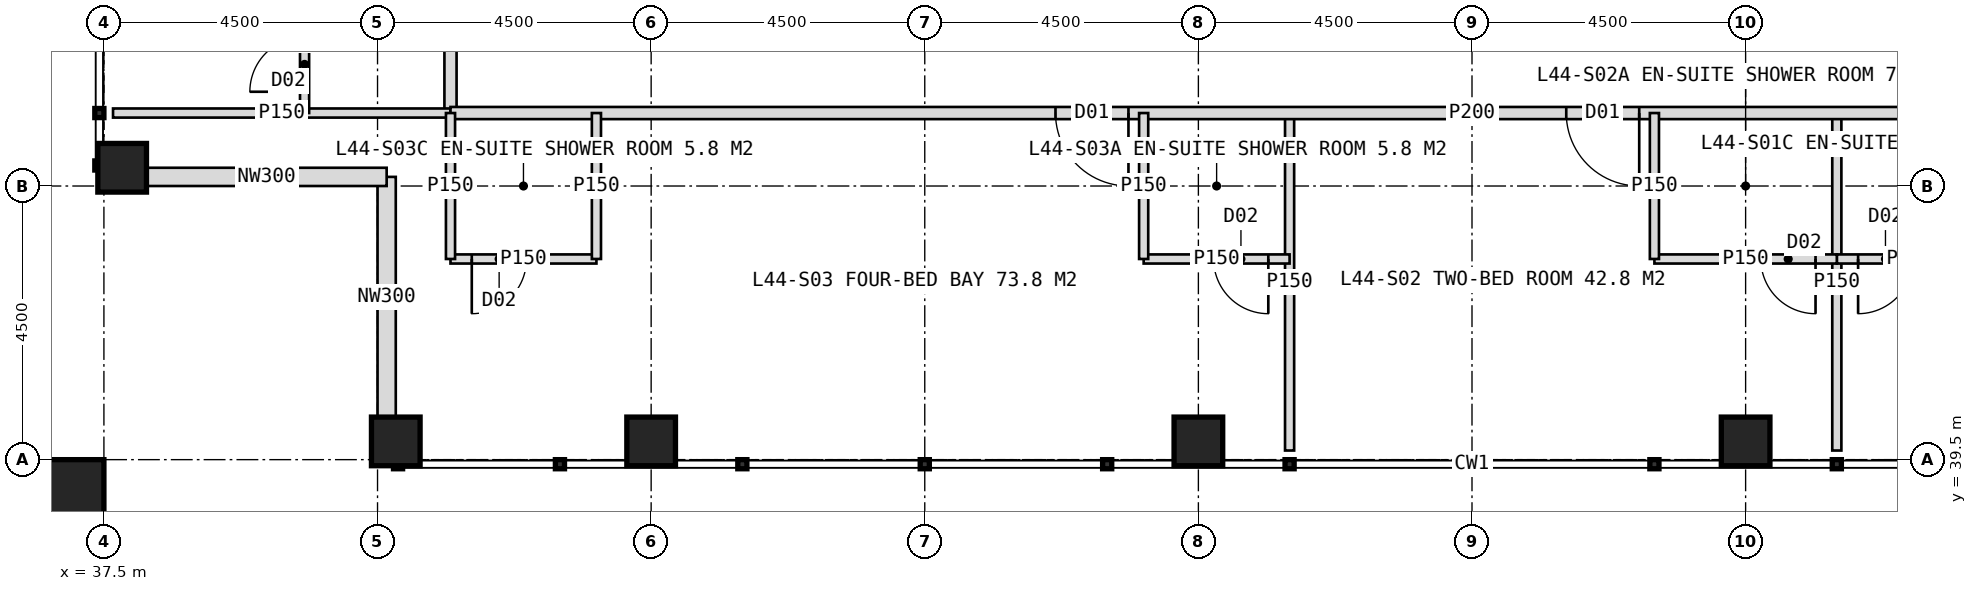
"""IFC4 building model, lengths in metres.
Left out: names, types, materials, properties, quantities, classifications, styles, units other than length and angle.
Written with IfcOpenShell. Run it as: python <this file> out.ifc"""

import sys

from ifc_helpers import new_model, si_unit, direction, frame, frame_2d, origin, origin_2d, place, context, subcontext, project, spatial, rectangle, hollow_rectangle, extrude, element, fill, save


model = new_model("IFC4")
c1 = context("Model", 3, precision=1e-05, world=origin(), true_north=direction((0.0, 1.0)))
c2 = subcontext(c1, "Body", "Model", "MODEL_VIEW")
j1 = project(units=[si_unit("LENGTHUNIT", "METRE"), si_unit("PLANEANGLEUNIT", "RADIAN")], contexts=[c1])
p1 = place(None, origin())
s1 = spatial("IfcSite", under=j1, at=p1, CompositionType="ELEMENT")
p2 = place(p1, origin())
s2 = spatial("IfcBuilding", under=s1, at=p2, CompositionType="ELEMENT")
p3 = place(p2, frame((0.0, 0.0, 185.0)))
s3 = spatial("IfcBuildingStorey", under=s2, at=p3, CompositionType="ELEMENT", Elevation=185.0)
for number, where, z_axis, x_axis in (
    (1, (42.3, 39.8, 0.0), (0.0, 0.0, 1.0), (1.0, 0.0, 0.0)),
    (2, (37.8, 44.3, 0.0), (0.0, 0.0, 1.0), (1.0, 0.0, 0.0)),
    (3, (46.5, 39.8, 0.0), (0.0, 0.0, 1.0), (1.0, 0.0, 0.0)),
    (4, (55.5, 39.8, 0.0), (0.0, 0.0, 1.0), (1.0, 0.0, 0.0)),
    (5, (64.5, 39.8, 0.0), (0.0, 0.0, 1.0), (1.0, 0.0, 0.0)),
):
    element("IfcColumn", number, at=place(p3, frame(where, z_axis=z_axis, x_axis=x_axis)), inside=s3, PredefinedType="COLUMN", context=c2, shape_type="SweptSolid", body=[
        extrude(hollow_rectangle(XDim=0.8, YDim=0.8, WallThickness=0.08, at=origin_2d()), origin(), (0.0, 0.0, 1.0), 4.0),
    ])
p4 = place(p3, frame((36.9, 38.9, 0.0), z_axis=(0.0, 0.0, 1.0), x_axis=(1.0, 0.0, 0.0)))
e6 = element("IfcColumn", 6, at=p4, inside=s3, PredefinedType="COLUMN", context=c2, shape_type="SweptSolid", body=[
    extrude(hollow_rectangle(XDim=1.2, YDim=1.2, WallThickness=0.07, at=origin_2d()), origin(), (0.0, 0.0, 1.0), 4.0),
])
for number, where, z_axis, x_axis in (
    (7, (42.15, 40.2, 0.0), (0.0, 0.0, 1.0), (0.0, 1.0, 0.0)),
    (8, (42.15, 44.15, 0.0), (0.0, 0.0, 1.0), (-1.0, 0.0, 0.0)),
):
    element("IfcWall", number, at=place(p3, frame(where, z_axis=z_axis, x_axis=x_axis)), inside=s3, PredefinedType="ELEMENTEDWALL", context=c2, shape_type="SweptSolid", body=[
        extrude(rectangle(XDim=3.95, YDim=0.3, at=frame_2d((1.975, 0.0))), origin(), (0.0, 0.0, 1.0), 2.85),
    ])
p5 = place(p3, frame((43.2, 45.2, 0.0), z_axis=(0.0, 0.0, 1.0), x_axis=(0.0, 1.0, 0.0)))
e9 = element("IfcWall", 9, at=p5, inside=s3, PredefinedType="PARTITIONING", context=c2, shape_type="SweptSolid", body=[
    extrude(rectangle(XDim=33.6, YDim=0.2, at=frame_2d((16.8, 0.0))), origin(), (0.0, 0.0, 1.0), 3.75),
])
p6 = place(p5, frame((2.65, 0.0, 0.0)))
e10 = element("IfcOpeningElement", 10, at=p6, cuts=e9, PredefinedType="OPENING", context=c2, shape_type="SweptSolid", body=[
    extrude(rectangle(XDim=1.2, YDim=2.2, at=frame_2d((0.6, 1.1))), frame((0.0, 0.11, 0.0), z_axis=(0.0, -1.0, 0.0), x_axis=(1.0, 0.0, 0.0)), (0.0, 0.0, 1.0), 0.22),
])
p7 = place(p5, frame((13.45, 0.0, 0.0)))
e11 = element("IfcOpeningElement", 11, at=p7, cuts=e9, PredefinedType="OPENING", context=c2, shape_type="SweptSolid", body=[
    extrude(rectangle(XDim=1.2, YDim=2.2, at=frame_2d((0.6, 1.1))), frame((0.0, 0.11, 0.0), z_axis=(0.0, -1.0, 0.0), x_axis=(1.0, 0.0, 0.0)), (0.0, 0.0, 1.0), 0.22),
])
p8 = place(p5, frame((20.05, 0.0, 0.0)))
e12 = element("IfcOpeningElement", 12, at=p8, cuts=e9, PredefinedType="OPENING", context=c2, shape_type="SweptSolid", body=[
    extrude(rectangle(XDim=1.2, YDim=2.2, at=frame_2d((0.6, 1.1))), frame((0.0, 0.11, 0.0), z_axis=(0.0, -1.0, 0.0), x_axis=(1.0, 0.0, 0.0)), (0.0, 0.0, 1.0), 0.22),
])
p9 = place(p5, frame((29.05, 0.0, 0.0)))
e13 = element("IfcOpeningElement", 13, at=p9, cuts=e9, PredefinedType="OPENING", context=c2, shape_type="SweptSolid", body=[
    extrude(rectangle(XDim=1.2, YDim=2.2, at=frame_2d((0.6, 1.1))), frame((0.0, 0.11, 0.0), z_axis=(0.0, -1.0, 0.0), x_axis=(1.0, 0.0, 0.0)), (0.0, 0.0, 1.0), 0.22),
])
p10 = place(p3, frame((43.2, 45.2, 0.0), z_axis=(0.0, 0.0, 1.0), x_axis=(-1.0, 0.0, 0.0)))
e14 = element("IfcWall", 14, at=p10, inside=s3, PredefinedType="PARTITIONING", context=c2, shape_type="SweptSolid", body=[
    extrude(rectangle(XDim=5.55, YDim=0.15, at=frame_2d((2.775, 0.0))), origin(), (0.0, 0.0, 1.0), 3.75),
])
p11 = place(p3, frame((40.8, 45.2, 0.0), z_axis=(0.0, 0.0, 1.0), x_axis=(0.0, 1.0, 0.0)))
e15 = element("IfcWall", 15, at=p11, inside=s3, PredefinedType="PARTITIONING", context=c2, shape_type="SweptSolid", body=[
    extrude(rectangle(XDim=2.4, YDim=0.15, at=frame_2d((1.2, 0.0))), origin(), (0.0, 0.0, 1.0), 3.75),
])
p12 = place(p11, frame((0.35, 0.0, 0.0)))
e16 = element("IfcOpeningElement", 16, at=p12, cuts=e15, PredefinedType="OPENING", context=c2, shape_type="SweptSolid", body=[
    extrude(rectangle(XDim=0.9, YDim=2.1, at=frame_2d((0.45, 1.05))), frame((0.0, 0.085, 0.0), z_axis=(0.0, -1.0, 0.0), x_axis=(1.0, 0.0, 0.0)), (0.0, 0.0, 1.0), 0.17),
])
for number, where, z_axis, x_axis in (
    (17, (66.0, 45.2, 0.0), (0.0, 0.0, 1.0), (0.0, -1.0, 0.0)),
    (18, (57.0, 45.2, 0.0), (0.0, 0.0, 1.0), (0.0, -1.0, 0.0)),
):
    element("IfcWall", number, at=place(p3, frame(where, z_axis=z_axis, x_axis=x_axis)), inside=s3, PredefinedType="PARTITIONING", context=c2, shape_type="SweptSolid", body=[
        extrude(rectangle(XDim=5.55, YDim=0.15, at=frame_2d((2.775, 0.0))), origin(), (0.0, 0.0, 1.0), 3.75),
    ])
p13 = place(p3, frame((76.8, 45.2, 0.0), z_axis=(0.0, 0.0, 1.0), x_axis=(-1.0, 0.0, 0.0)))
e19 = element("IfcWall", 19, at=p13, inside=s3, PredefinedType="PARTITIONING", context=c2, shape_type="SweptSolid", body=[
    extrude(rectangle(XDim=33.6, YDim=0.2, at=frame_2d((16.8, 0.0))), origin(), (0.0, 0.0, 1.0), 3.75),
])
p14 = place(p13, frame((2.65, 0.0, 0.0)))
e20 = element("IfcOpeningElement", 20, at=p14, cuts=e19, PredefinedType="OPENING", context=c2, shape_type="SweptSolid", body=[
    extrude(rectangle(XDim=1.2, YDim=2.2, at=frame_2d((0.6, 1.1))), frame((0.0, 0.11, 0.0), z_axis=(0.0, -1.0, 0.0), x_axis=(1.0, 0.0, 0.0)), (0.0, 0.0, 1.0), 0.22),
])
p15 = place(p13, frame((14.05, 0.0, 0.0)))
e21 = element("IfcOpeningElement", 21, at=p15, cuts=e19, PredefinedType="OPENING", context=c2, shape_type="SweptSolid", body=[
    extrude(rectangle(XDim=1.2, YDim=2.2, at=frame_2d((0.6, 1.1))), frame((0.0, 0.11, 0.0), z_axis=(0.0, -1.0, 0.0), x_axis=(1.0, 0.0, 0.0)), (0.0, 0.0, 1.0), 0.22),
])
p16 = place(p13, frame((22.45, 0.0, 0.0)))
e22 = element("IfcOpeningElement", 22, at=p16, cuts=e19, PredefinedType="OPENING", context=c2, shape_type="SweptSolid", body=[
    extrude(rectangle(XDim=1.2, YDim=2.2, at=frame_2d((0.6, 1.1))), frame((0.0, 0.11, 0.0), z_axis=(0.0, -1.0, 0.0), x_axis=(1.0, 0.0, 0.0)), (0.0, 0.0, 1.0), 0.22),
])
p17 = place(p3, frame((68.4, 42.8, 0.0), z_axis=(0.0, 0.0, 1.0), x_axis=(-1.0, 0.0, 0.0)))
e23 = element("IfcWall", 23, at=p17, inside=s3, PredefinedType="PARTITIONING", context=c2, shape_type="SweptSolid", body=[
    extrude(rectangle(XDim=2.4, YDim=0.15, at=frame_2d((1.2, 0.0))), origin(), (0.0, 0.0, 1.0), 3.75),
])
p18 = place(p17, frame((1.15, 0.0, 0.0)))
e24 = element("IfcOpeningElement", 24, at=p18, cuts=e23, PredefinedType="OPENING", context=c2, shape_type="SweptSolid", body=[
    extrude(rectangle(XDim=0.9, YDim=2.1, at=frame_2d((0.45, 1.05))), frame((0.0, 0.085, 0.0), z_axis=(0.0, -1.0, 0.0), x_axis=(1.0, 0.0, 0.0)), (0.0, 0.0, 1.0), 0.17),
])
p19 = place(p3, frame((66.0, 42.8, 0.0), z_axis=(0.0, 0.0, 1.0), x_axis=(-1.0, 0.0, 0.0)))
e25 = element("IfcWall", 25, at=p19, inside=s3, PredefinedType="PARTITIONING", context=c2, shape_type="SweptSolid", body=[
    extrude(rectangle(XDim=3.0, YDim=0.15, at=frame_2d((1.5, 0.0))), origin(), (0.0, 0.0, 1.0), 3.75),
])
p20 = place(p19, frame((0.35, 0.0, 0.0)))
e26 = element("IfcOpeningElement", 26, at=p20, cuts=e25, PredefinedType="OPENING", context=c2, shape_type="SweptSolid", body=[
    extrude(rectangle(XDim=0.9, YDim=2.1, at=frame_2d((0.45, 1.05))), frame((0.0, 0.085, 0.0), z_axis=(0.0, -1.0, 0.0), x_axis=(1.0, 0.0, 0.0)), (0.0, 0.0, 1.0), 0.17),
])
p21 = place(p3, frame((63.0, 45.2, 0.0), z_axis=(0.0, 0.0, 1.0), x_axis=(0.0, -1.0, 0.0)))
e27 = element("IfcWall", 27, at=p21, inside=s3, PredefinedType="PARTITIONING", context=c2, shape_type="SweptSolid", body=[
    extrude(rectangle(XDim=2.4, YDim=0.15, at=frame_2d((1.2, 0.0))), origin(), (0.0, 0.0, 1.0), 3.75),
])
p22 = place(p3, frame((57.0, 42.8, 0.0), z_axis=(0.0, 0.0, 1.0), x_axis=(-1.0, 0.0, 0.0)))
e28 = element("IfcWall", 28, at=p22, inside=s3, PredefinedType="PARTITIONING", context=c2, shape_type="SweptSolid", body=[
    extrude(rectangle(XDim=2.4, YDim=0.15, at=frame_2d((1.2, 0.0))), origin(), (0.0, 0.0, 1.0), 3.75),
])
p23 = place(p22, frame((0.35, 0.0, 0.0)))
e29 = element("IfcOpeningElement", 29, at=p23, cuts=e28, PredefinedType="OPENING", context=c2, shape_type="SweptSolid", body=[
    extrude(rectangle(XDim=0.9, YDim=2.1, at=frame_2d((0.45, 1.05))), frame((0.0, 0.085, 0.0), z_axis=(0.0, -1.0, 0.0), x_axis=(1.0, 0.0, 0.0)), (0.0, 0.0, 1.0), 0.17),
])
p24 = place(p3, frame((54.6, 45.2, 0.0), z_axis=(0.0, 0.0, 1.0), x_axis=(0.0, -1.0, 0.0)))
e30 = element("IfcWall", 30, at=p24, inside=s3, PredefinedType="PARTITIONING", context=c2, shape_type="SweptSolid", body=[
    extrude(rectangle(XDim=2.4, YDim=0.15, at=frame_2d((1.2, 0.0))), origin(), (0.0, 0.0, 1.0), 3.75),
])
p25 = place(p3, frame((45.6, 42.8, 0.0), z_axis=(0.0, 0.0, 1.0), x_axis=(-1.0, 0.0, 0.0)))
e31 = element("IfcWall", 31, at=p25, inside=s3, PredefinedType="PARTITIONING", context=c2, shape_type="SweptSolid", body=[
    extrude(rectangle(XDim=2.4, YDim=0.15, at=frame_2d((1.2, 0.0))), origin(), (0.0, 0.0, 1.0), 3.75),
])
p26 = place(p25, frame((1.15, 0.0, 0.0)))
e32 = element("IfcOpeningElement", 32, at=p26, cuts=e31, PredefinedType="OPENING", context=c2, shape_type="SweptSolid", body=[
    extrude(rectangle(XDim=0.9, YDim=2.1, at=frame_2d((0.45, 1.05))), frame((0.0, 0.085, 0.0), z_axis=(0.0, -1.0, 0.0), x_axis=(1.0, 0.0, 0.0)), (0.0, 0.0, 1.0), 0.17),
])
for number, where, z_axis, x_axis in (
    (33, (45.6, 45.2, 0.0), (0.0, 0.0, 1.0), (0.0, -1.0, 0.0)),
    (34, (43.2, 45.2, 0.0), (0.0, 0.0, 1.0), (0.0, -1.0, 0.0)),
):
    element("IfcWall", number, at=place(p3, frame(where, z_axis=z_axis, x_axis=x_axis)), inside=s3, PredefinedType="PARTITIONING", context=c2, shape_type="SweptSolid", body=[
        extrude(rectangle(XDim=2.4, YDim=0.15, at=frame_2d((1.2, 0.0))), origin(), (0.0, 0.0, 1.0), 3.75),
    ])
p27 = place(p12, origin())
e35 = element("IfcDoor", 35, at=p27, inside=s3, OperationType="SINGLE_SWING_LEFT", PredefinedType="DOOR", context=c2, shape_type="SweptSolid", body=[
    extrude(rectangle(XDim=0.9, YDim=2.1, at=frame_2d((0.45, 1.05))), frame((0.0, 0.025, 0.0), z_axis=(0.0, -1.0, 0.0), x_axis=(1.0, 0.0, 0.0)), (0.0, 0.0, 1.0), 0.05),
])
fill(e16, e35)
p28 = place(p18, origin())
e36 = element("IfcDoor", 36, at=p28, inside=s3, OperationType="SINGLE_SWING_RIGHT", PredefinedType="DOOR", context=c2, shape_type="SweptSolid", body=[
    extrude(rectangle(XDim=0.9, YDim=2.1, at=frame_2d((0.45, 1.05))), frame((0.0, 0.025, 0.0), z_axis=(0.0, -1.0, 0.0), x_axis=(1.0, 0.0, 0.0)), (0.0, 0.0, 1.0), 0.05),
])
fill(e24, e36)
p29 = place(p15, origin())
e37 = element("IfcDoor", 37, at=p29, inside=s3, OperationType="SINGLE_SWING_LEFT", PredefinedType="DOOR", context=c2, shape_type="SweptSolid", body=[
    extrude(rectangle(XDim=1.2, YDim=2.2, at=frame_2d((0.6, 1.1))), frame((0.0, 0.025, 0.0), z_axis=(0.0, -1.0, 0.0), x_axis=(1.0, 0.0, 0.0)), (0.0, 0.0, 1.0), 0.05),
])
fill(e21, e37)
p30 = place(p20, origin())
e38 = element("IfcDoor", 38, at=p30, inside=s3, OperationType="SINGLE_SWING_LEFT", PredefinedType="DOOR", context=c2, shape_type="SweptSolid", body=[
    extrude(rectangle(XDim=0.9, YDim=2.1, at=frame_2d((0.45, 1.05))), frame((0.0, 0.025, 0.0), z_axis=(0.0, -1.0, 0.0), x_axis=(1.0, 0.0, 0.0)), (0.0, 0.0, 1.0), 0.05),
])
fill(e26, e38)
p31 = place(p16, origin())
e39 = element("IfcDoor", 39, at=p31, inside=s3, OperationType="SINGLE_SWING_LEFT", PredefinedType="DOOR", context=c2, shape_type="SweptSolid", body=[
    extrude(rectangle(XDim=1.2, YDim=2.2, at=frame_2d((0.6, 1.1))), frame((0.0, 0.025, 0.0), z_axis=(0.0, -1.0, 0.0), x_axis=(1.0, 0.0, 0.0)), (0.0, 0.0, 1.0), 0.05),
])
fill(e22, e39)
p32 = place(p23, origin())
e40 = element("IfcDoor", 40, at=p32, inside=s3, OperationType="SINGLE_SWING_LEFT", PredefinedType="DOOR", context=c2, shape_type="SweptSolid", body=[
    extrude(rectangle(XDim=0.9, YDim=2.1, at=frame_2d((0.45, 1.05))), frame((0.0, 0.025, 0.0), z_axis=(0.0, -1.0, 0.0), x_axis=(1.0, 0.0, 0.0)), (0.0, 0.0, 1.0), 0.05),
])
fill(e29, e40)
p33 = place(p26, origin())
e41 = element("IfcDoor", 41, at=p33, inside=s3, OperationType="SINGLE_SWING_RIGHT", PredefinedType="DOOR", context=c2, shape_type="SweptSolid", body=[
    extrude(rectangle(XDim=0.9, YDim=2.1, at=frame_2d((0.45, 1.05))), frame((0.0, 0.025, 0.0), z_axis=(0.0, -1.0, 0.0), x_axis=(1.0, 0.0, 0.0)), (0.0, 0.0, 1.0), 0.05),
])
fill(e32, e41)
save(model, sys.argv[1])
